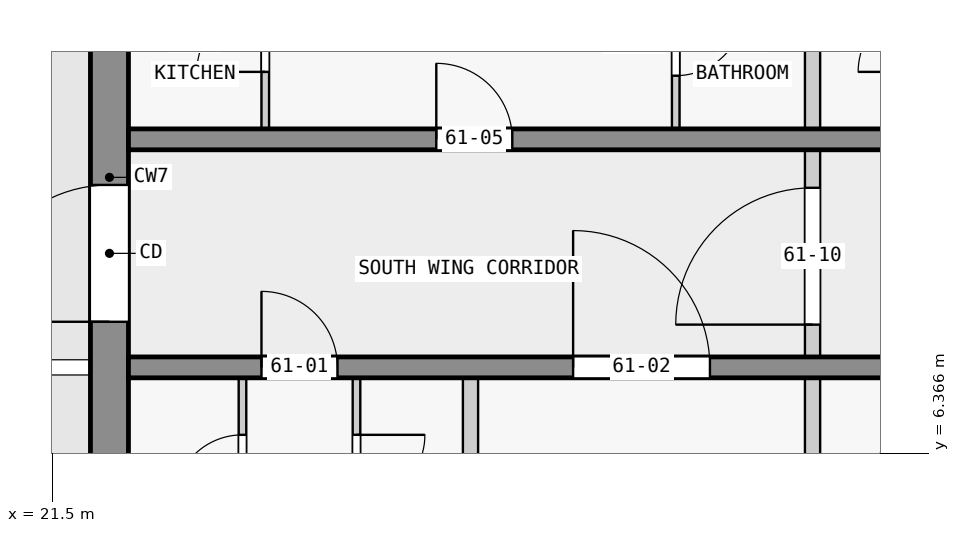
"""IFC4 building model, lengths in metres.
Left out: names, types, materials, properties, quantities, classifications, styles, units other than length and angle.
Written with IfcOpenShell. Run it as: python <this file> out.ifc"""

import sys

from ifc_helpers import new_model, si_unit, direction, frame, frame_2d, origin, place, context, subcontext, project, spatial, rectangle, extrude, element, fill, save


model = new_model("IFC4")
c1 = context("Model", 3, precision=1e-05, world=origin(), true_north=direction((0.0, 1.0)))
c2 = subcontext(c1, "Body", "Model", "MODEL_VIEW")
j1 = project(units=[si_unit("LENGTHUNIT", "METRE"), si_unit("PLANEANGLEUNIT", "RADIAN")], contexts=[c1])
p1 = place(None, origin())
s1 = spatial("IfcSite", under=j1, at=p1, CompositionType="ELEMENT")
p2 = place(p1, origin())
s2 = spatial("IfcBuilding", under=s1, at=p2, CompositionType="ELEMENT")
p3 = place(p2, frame((0.0, 0.0, 232.9)))
s3 = spatial("IfcBuildingStorey", under=s2, at=p3, CompositionType="ELEMENT", Elevation=232.9)
p4 = place(p3, frame((22.25, 2.5, 0.0), z_axis=(0.0, 0.0, 1.0), x_axis=(0.0, 1.0, 0.0)))
e1 = element("IfcWall", 1, at=p4, inside=s3, PredefinedType="SHEAR", context=c2, shape_type="SweptSolid", body=[
    extrude(rectangle(XDim=15.0, YDim=0.5, at=frame_2d((7.5, 0.0))), origin(), (0.0, 0.0, 1.0), 3.2),
])
p5 = place(p4, frame((5.6, 0.0, 0.0)))
e2 = element("IfcOpeningElement", 2, at=p5, cuts=e1, PredefinedType="OPENING", context=c2, shape_type="SweptSolid", body=[
    extrude(rectangle(XDim=1.8, YDim=2.1, at=frame_2d((0.9, 1.05))), frame((0.0, 0.26, 0.0), z_axis=(0.0, -1.0, 0.0), x_axis=(1.0, 0.0, 0.0)), (0.0, 0.0, 1.0), 0.52),
])
p6 = place(p3, frame((22.5, 7.5, 0.0), z_axis=(0.0, 0.0, 1.0), x_axis=(1.0, 0.0, 0.0)))
e3 = element("IfcWall", 3, at=p6, inside=s3, PredefinedType="SHEAR", context=c2, shape_type="SweptSolid", body=[
    extrude(rectangle(XDim=22.5, YDim=0.275, at=frame_2d((11.25, 0.0))), origin(), (0.0, 0.0, 1.0), 3.2),
])
p7 = place(p6, frame((1.75, 0.0, 0.0)))
e4 = element("IfcOpeningElement", 4, at=p7, cuts=e3, PredefinedType="OPENING", context=c2, shape_type="SweptSolid", body=[
    extrude(rectangle(XDim=1.0, YDim=2.1, at=frame_2d((0.5, 1.05))), frame((0.0, 0.147, 0.0), z_axis=(0.0, -1.0, 0.0), x_axis=(1.0, 0.0, 0.0)), (0.0, 0.0, 1.0), 0.295),
])
p8 = place(p6, frame((5.85, 0.0, 0.0)))
e5 = element("IfcOpeningElement", 5, at=p8, cuts=e3, PredefinedType="OPENING", context=c2, shape_type="SweptSolid", body=[
    extrude(rectangle(XDim=1.8, YDim=2.1, at=frame_2d((0.9, 1.05))), frame((0.0, 0.147, 0.0), z_axis=(0.0, -1.0, 0.0), x_axis=(1.0, 0.0, 0.0)), (0.0, 0.0, 1.0), 0.295),
])
p9 = place(p6, frame((10.75, 0.0, 0.0)))
e6 = element("IfcOpeningElement", 6, at=p9, cuts=e3, PredefinedType="OPENING", context=c2, shape_type="SweptSolid", body=[
    extrude(rectangle(XDim=1.0, YDim=2.1, at=frame_2d((0.5, 1.05))), frame((0.0, 0.147, 0.0), z_axis=(0.0, -1.0, 0.0), x_axis=(1.0, 0.0, 0.0)), (0.0, 0.0, 1.0), 0.295),
])
p10 = place(p6, frame((16.85, 0.0, 0.0)))
e7 = element("IfcOpeningElement", 7, at=p10, cuts=e3, PredefinedType="OPENING", context=c2, shape_type="SweptSolid", body=[
    extrude(rectangle(XDim=1.0, YDim=2.1, at=frame_2d((0.5, 1.05))), frame((0.0, 0.147, 0.0), z_axis=(0.0, -1.0, 0.0), x_axis=(1.0, 0.0, 0.0)), (0.0, 0.0, 1.0), 0.295),
])
p11 = place(p3, frame((22.5, 10.5, 0.0), z_axis=(0.0, 0.0, 1.0), x_axis=(1.0, 0.0, 0.0)))
e8 = element("IfcWall", 8, at=p11, inside=s3, PredefinedType="SHEAR", context=c2, shape_type="SweptSolid", body=[
    extrude(rectangle(XDim=22.5, YDim=0.275, at=frame_2d((11.25, 0.0))), origin(), (0.0, 0.0, 1.0), 3.2),
])
p12 = place(p11, frame((4.05, 0.0, 0.0)))
e9 = element("IfcOpeningElement", 9, at=p12, cuts=e8, PredefinedType="OPENING", context=c2, shape_type="SweptSolid", body=[
    extrude(rectangle(XDim=1.0, YDim=2.1, at=frame_2d((0.5, 1.05))), frame((0.0, 0.147, 0.0), z_axis=(0.0, -1.0, 0.0), x_axis=(1.0, 0.0, 0.0)), (0.0, 0.0, 1.0), 0.295),
])
p13 = place(p11, frame((10.75, 0.0, 0.0)))
e10 = element("IfcOpeningElement", 10, at=p13, cuts=e8, PredefinedType="OPENING", context=c2, shape_type="SweptSolid", body=[
    extrude(rectangle(XDim=1.0, YDim=2.1, at=frame_2d((0.5, 1.05))), frame((0.0, 0.147, 0.0), z_axis=(0.0, -1.0, 0.0), x_axis=(1.0, 0.0, 0.0)), (0.0, 0.0, 1.0), 0.295),
])
p14 = place(p11, frame((15.25, 0.0, 0.0)))
e11 = element("IfcOpeningElement", 11, at=p14, cuts=e8, PredefinedType="OPENING", context=c2, shape_type="SweptSolid", body=[
    extrude(rectangle(XDim=1.0, YDim=2.1, at=frame_2d((0.5, 1.05))), frame((0.0, 0.147, 0.0), z_axis=(0.0, -1.0, 0.0), x_axis=(1.0, 0.0, 0.0)), (0.0, 0.0, 1.0), 0.295),
])
p15 = place(p11, frame((18.75, 0.0, 0.0)))
e12 = element("IfcOpeningElement", 12, at=p15, cuts=e8, PredefinedType="OPENING", context=c2, shape_type="SweptSolid", body=[
    extrude(rectangle(XDim=0.9, YDim=2.1, at=frame_2d((0.45, 1.05))), frame((0.0, 0.147, 0.0), z_axis=(0.0, -1.0, 0.0), x_axis=(1.0, 0.0, 0.0)), (0.0, 0.0, 1.0), 0.295),
])
p16 = place(p11, frame((20.95, 0.0, 0.0)))
e13 = element("IfcOpeningElement", 13, at=p16, cuts=e8, PredefinedType="OPENING", context=c2, shape_type="SweptSolid", body=[
    extrude(rectangle(XDim=1.0, YDim=2.1, at=frame_2d((0.5, 1.05))), frame((0.0, 0.147, 0.0), z_axis=(0.0, -1.0, 0.0), x_axis=(1.0, 0.0, 0.0)), (0.0, 0.0, 1.0), 0.295),
])
p17 = place(p3, frame((24.0, 4.962, 0.0), z_axis=(0.0, 0.0, 1.0), x_axis=(0.0, 1.0, 0.0)))
e14 = element("IfcWall", 14, at=p17, inside=s3, PredefinedType="PARTITIONING", context=c2, shape_type="SweptSolid", body=[
    extrude(rectangle(XDim=2.4, YDim=0.1, at=frame_2d((1.2, 0.0))), origin(), (0.0, 0.0, 1.0), 3.2),
])
p18 = place(p17, frame((0.75, 0.0, 0.0)))
e15 = element("IfcOpeningElement", 15, at=p18, cuts=e14, PredefinedType="OPENING", context=c2, shape_type="SweptSolid", body=[
    extrude(rectangle(XDim=0.9, YDim=2.1, at=frame_2d((0.45, 1.05))), frame((0.0, 0.06, 0.0), z_axis=(0.0, -1.0, 0.0), x_axis=(1.0, 0.0, 0.0)), (0.0, 0.0, 1.0), 0.12),
])
p19 = place(p3, frame((24.3, 10.637, 0.0), z_axis=(0.0, 0.0, 1.0), x_axis=(0.0, 1.0, 0.0)))
e16 = element("IfcWall", 16, at=p19, inside=s3, PredefinedType="PARTITIONING", context=c2, shape_type="SweptSolid", body=[
    extrude(rectangle(XDim=2.4, YDim=0.1, at=frame_2d((1.2, 0.0))), origin(), (0.0, 0.0, 1.0), 3.2),
])
p20 = place(p19, frame((0.75, 0.0, 0.0)))
e17 = element("IfcOpeningElement", 17, at=p20, cuts=e16, PredefinedType="OPENING", context=c2, shape_type="SweptSolid", body=[
    extrude(rectangle(XDim=0.9, YDim=2.1, at=frame_2d((0.45, 1.05))), frame((0.0, 0.06, 0.0), z_axis=(0.0, -1.0, 0.0), x_axis=(1.0, 0.0, 0.0)), (0.0, 0.0, 1.0), 0.12),
])
p21 = place(p3, frame((25.5, 7.363, 0.0), z_axis=(0.0, 0.0, 1.0), x_axis=(0.0, -1.0, 0.0)))
e18 = element("IfcWall", 18, at=p21, inside=s3, PredefinedType="PARTITIONING", context=c2, shape_type="SweptSolid", body=[
    extrude(rectangle(XDim=2.4, YDim=0.1, at=frame_2d((1.2, 0.0))), origin(), (0.0, 0.0, 1.0), 3.2),
])
p22 = place(p21, frame((0.75, 0.0, 0.0)))
e19 = element("IfcOpeningElement", 19, at=p22, cuts=e18, PredefinedType="OPENING", context=c2, shape_type="SweptSolid", body=[
    extrude(rectangle(XDim=0.9, YDim=2.1, at=frame_2d((0.45, 1.05))), frame((0.0, 0.06, 0.0), z_axis=(0.0, -1.0, 0.0), x_axis=(1.0, 0.0, 0.0)), (0.0, 0.0, 1.0), 0.12),
])
p23 = place(p3, frame((27.0, 5.062, 0.0), z_axis=(0.0, 0.0, 1.0), x_axis=(0.0, 1.0, 0.0)))
e20 = element("IfcWall", 20, at=p23, inside=s3, PredefinedType="PARTITIONING", context=c2, shape_type="SweptSolid", body=[
    extrude(rectangle(XDim=2.3, YDim=0.2, at=frame_2d((1.15, 0.0))), origin(), (0.0, 0.0, 1.0), 3.2),
])
p24 = place(p3, frame((29.7, 12.988, 0.0), z_axis=(0.0, 0.0, 1.0), x_axis=(0.0, -1.0, 0.0)))
e21 = element("IfcWall", 21, at=p24, inside=s3, PredefinedType="PARTITIONING", context=c2, shape_type="SweptSolid", body=[
    extrude(rectangle(XDim=2.35, YDim=0.1, at=frame_2d((1.175, 0.0))), origin(), (0.0, 0.0, 1.0), 3.2),
])
p25 = place(p24, frame((0.75, 0.0, 0.0)))
e22 = element("IfcOpeningElement", 22, at=p25, cuts=e21, PredefinedType="OPENING", context=c2, shape_type="SweptSolid", body=[
    extrude(rectangle(XDim=0.9, YDim=2.1, at=frame_2d((0.45, 1.05))), frame((0.0, 0.06, 0.0), z_axis=(0.0, -1.0, 0.0), x_axis=(1.0, 0.0, 0.0)), (0.0, 0.0, 1.0), 0.12),
])
for number, where, z_axis, x_axis in (
    (23, (31.5, 1.122, 0.0), (0.0, 0.0, 1.0), (0.0, 1.0, 0.0)),
    (24, (31.5, 10.637, 0.0), (0.0, 0.0, 1.0), (0.0, 1.0, 0.0)),
):
    element("IfcWall", number, at=place(p3, frame(where, z_axis=z_axis, x_axis=x_axis)), inside=s3, PredefinedType="PARTITIONING", context=c2, shape_type="SweptSolid", body=[
        extrude(rectangle(XDim=6.24, YDim=0.2, at=frame_2d((3.12, 0.0))), origin(), (0.0, 0.0, 1.0), 3.2),
    ])
p26 = place(p3, frame((31.5, 7.462, 0.0), z_axis=(0.0, 0.0, 1.0), x_axis=(0.0, 1.0, 0.0)))
e25 = element("IfcWall", 25, at=p26, inside=s3, PredefinedType="PARTITIONING", context=c2, shape_type="SweptSolid", body=[
    extrude(rectangle(XDim=3.075, YDim=0.2, at=frame_2d((1.538, 0.0))), origin(), (0.0, 0.0, 1.0), 3.2),
])
p27 = place(p26, frame((0.6, 0.0, 0.0)))
e26 = element("IfcOpeningElement", 26, at=p27, cuts=e25, PredefinedType="OPENING", context=c2, shape_type="SweptSolid", body=[
    extrude(rectangle(XDim=1.8, YDim=2.1, at=frame_2d((0.9, 1.05))), frame((0.0, 0.11, 0.0), z_axis=(0.0, -1.0, 0.0), x_axis=(1.0, 0.0, 0.0)), (0.0, 0.0, 1.0), 0.22),
])
p28 = place(p5, origin())
e27 = element("IfcDoor", 27, at=p28, inside=s3, OperationType="DOUBLE_DOOR_SINGLE_SWING", PredefinedType="DOOR", context=c2, shape_type="SweptSolid", body=[
    extrude(rectangle(XDim=1.8, YDim=2.1, at=frame_2d((0.9, 1.05))), frame((0.0, 0.025, 0.0), z_axis=(0.0, -1.0, 0.0), x_axis=(1.0, 0.0, 0.0)), (0.0, 0.0, 1.0), 0.05),
])
fill(e2, e27)
p29 = place(p7, origin())
e28 = element("IfcDoor", 28, at=p29, inside=s3, OperationType="SINGLE_SWING_LEFT", PredefinedType="DOOR", context=c2, shape_type="SweptSolid", body=[
    extrude(rectangle(XDim=1.0, YDim=2.1, at=frame_2d((0.5, 1.05))), frame((0.0, 0.025, 0.0), z_axis=(0.0, -1.0, 0.0), x_axis=(1.0, 0.0, 0.0)), (0.0, 0.0, 1.0), 0.05),
])
fill(e4, e28)
p30 = place(p8, origin())
e29 = element("IfcDoor", 29, at=p30, inside=s3, OperationType="SINGLE_SWING_LEFT", PredefinedType="DOOR", context=c2, shape_type="SweptSolid", body=[
    extrude(rectangle(XDim=1.8, YDim=2.1, at=frame_2d((0.9, 1.05))), frame((0.0, 0.025, 0.0), z_axis=(0.0, -1.0, 0.0), x_axis=(1.0, 0.0, 0.0)), (0.0, 0.0, 1.0), 0.05),
])
fill(e5, e29)
p31 = place(p12, origin())
e30 = element("IfcDoor", 30, at=p31, inside=s3, OperationType="SINGLE_SWING_LEFT", PredefinedType="DOOR", context=c2, shape_type="SweptSolid", body=[
    extrude(rectangle(XDim=1.0, YDim=2.1, at=frame_2d((0.5, 1.05))), frame((0.0, 0.025, 0.0), z_axis=(0.0, -1.0, 0.0), x_axis=(1.0, 0.0, 0.0)), (0.0, 0.0, 1.0), 0.05),
])
fill(e9, e30)
p32 = place(p27, origin())
e31 = element("IfcDoor", 31, at=p32, inside=s3, OperationType="SINGLE_SWING_LEFT", PredefinedType="DOOR", context=c2, shape_type="SweptSolid", body=[
    extrude(rectangle(XDim=1.8, YDim=2.1, at=frame_2d((0.9, 1.05))), frame((0.0, 0.025, 0.0), z_axis=(0.0, -1.0, 0.0), x_axis=(1.0, 0.0, 0.0)), (0.0, 0.0, 1.0), 0.05),
])
fill(e26, e31)
p33 = place(p18, origin())
e32 = element("IfcDoor", 32, at=p33, inside=s3, OperationType="SINGLE_SWING_RIGHT", PredefinedType="DOOR", context=c2, shape_type="SweptSolid", body=[
    extrude(rectangle(XDim=0.9, YDim=2.1, at=frame_2d((0.45, 1.05))), frame((0.0, 0.025, 0.0), z_axis=(0.0, -1.0, 0.0), x_axis=(1.0, 0.0, 0.0)), (0.0, 0.0, 1.0), 0.05),
])
fill(e15, e32)
p34 = place(p22, origin())
e33 = element("IfcDoor", 33, at=p34, inside=s3, OperationType="SINGLE_SWING_RIGHT", PredefinedType="DOOR", context=c2, shape_type="SweptSolid", body=[
    extrude(rectangle(XDim=0.9, YDim=2.1, at=frame_2d((0.45, 1.05))), frame((0.0, 0.025, 0.0), z_axis=(0.0, -1.0, 0.0), x_axis=(1.0, 0.0, 0.0)), (0.0, 0.0, 1.0), 0.05),
])
fill(e19, e33)
p35 = place(p20, origin())
e34 = element("IfcDoor", 34, at=p35, inside=s3, OperationType="SINGLE_SWING_LEFT", PredefinedType="DOOR", context=c2, shape_type="SweptSolid", body=[
    extrude(rectangle(XDim=0.9, YDim=2.1, at=frame_2d((0.45, 1.05))), frame((0.0, 0.025, 0.0), z_axis=(0.0, -1.0, 0.0), x_axis=(1.0, 0.0, 0.0)), (0.0, 0.0, 1.0), 0.05),
])
fill(e17, e34)
p36 = place(p25, origin())
e35 = element("IfcDoor", 35, at=p36, inside=s3, OperationType="SINGLE_SWING_RIGHT", PredefinedType="DOOR", context=c2, shape_type="SweptSolid", body=[
    extrude(rectangle(XDim=0.9, YDim=2.1, at=frame_2d((0.45, 1.05))), frame((0.0, 0.025, 0.0), z_axis=(0.0, -1.0, 0.0), x_axis=(1.0, 0.0, 0.0)), (0.0, 0.0, 1.0), 0.05),
])
fill(e22, e35)
save(model, sys.argv[1])
